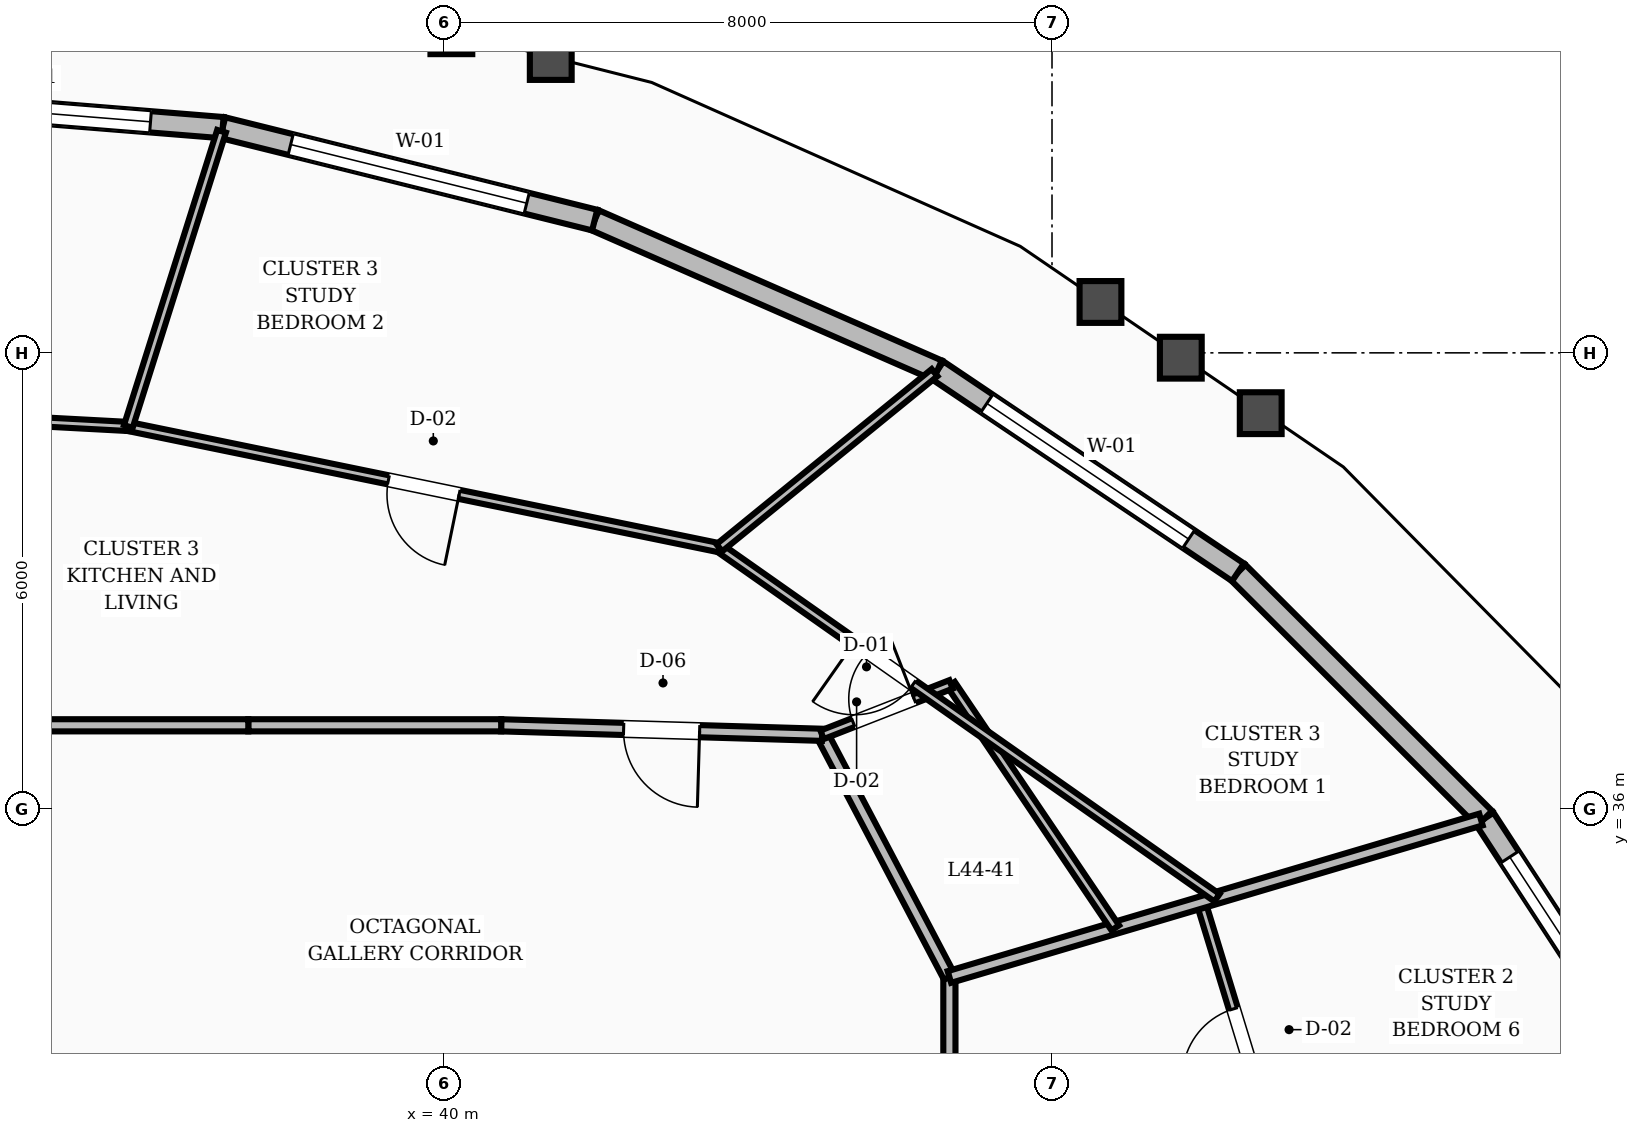
"""IFC4 building model, lengths in metres.
Left out: names, types, materials, properties, quantities, classifications, styles, units other than length and angle.
Written with IfcOpenShell. Run it as: python <this file> out.ifc"""

import sys

from ifc_helpers import new_model, si_unit, direction, frame, frame_2d, origin, place, context, subcontext, project, spatial, rectangle, extrude, element, fill, save


model = new_model("IFC4")
c1 = context("Model", 3, precision=1e-05, world=origin(), true_north=direction((0.0, 1.0)))
c2 = subcontext(c1, "Body", "Model", "MODEL_VIEW")
j1 = project(units=[si_unit("LENGTHUNIT", "METRE"), si_unit("PLANEANGLEUNIT", "RADIAN")], contexts=[c1])
p1 = place(None, origin())
s1 = spatial("IfcSite", under=j1, at=p1, CompositionType="ELEMENT")
p2 = place(p1, origin())
s2 = spatial("IfcBuilding", under=s1, at=p2, CompositionType="ELEMENT")
p3 = place(p2, frame((0.0, 0.0, 171.2)))
s3 = spatial("IfcBuildingStorey", under=s2, at=p3, CompositionType="ELEMENT", Elevation=171.2)
p4 = place(p3, frame((56.102, 32.179, 0.0), z_axis=(0.0, 0.0, 1.0), x_axis=(-0.546411241489, 0.837517017841, 0.0)))
e1 = element("IfcWall", 1, at=p4, inside=s3, PredefinedType="STANDARD", context=c2, shape_type="SweptSolid", body=[
    extrude(rectangle(XDim=4.412, YDim=0.28, at=frame_2d((2.206, 0.0))), origin(), (0.0, 0.0, 1.0), 2.82),
])
p5 = place(p4, frame((0.606, 0.0, 0.8)))
e2 = element("IfcOpeningElement", 2, at=p5, cuts=e1, PredefinedType="OPENING", context=c2, shape_type="SweptSolid", body=[
    extrude(rectangle(XDim=3.2, YDim=1.65, at=frame_2d((1.6, 0.825))), frame((0.0, 0.15, 0.0), z_axis=(0.0, -1.0, 0.0), x_axis=(1.0, 0.0, 0.0)), (0.0, 0.0, 1.0), 0.3),
])
p6 = place(p3, frame((53.691, 35.875, 0.0), z_axis=(0.0, 0.0, 1.0), x_axis=(-0.707692376563, 0.706520700443, 0.0)))
e3 = element("IfcWall", 3, at=p6, inside=s3, PredefinedType="STANDARD", context=c2, shape_type="SweptSolid", body=[
    extrude(rectangle(XDim=4.584, YDim=0.28, at=frame_2d((2.292, 0.0))), origin(), (0.0, 0.0, 1.0), 2.82),
])
p7 = place(p3, frame((50.447, 39.113, 0.0), z_axis=(0.0, 0.0, 1.0), x_axis=(-0.82985197946, 0.557983594909, 0.0)))
e4 = element("IfcWall", 4, at=p7, inside=s3, PredefinedType="STANDARD", context=c2, shape_type="SweptSolid", body=[
    extrude(rectangle(XDim=4.764, YDim=0.28, at=frame_2d((2.382, 0.0))), origin(), (0.0, 0.0, 1.0), 2.82),
])
p8 = place(p7, frame((0.782, 0.0, 0.8)))
e5 = element("IfcOpeningElement", 5, at=p8, cuts=e4, PredefinedType="OPENING", context=c2, shape_type="SweptSolid", body=[
    extrude(rectangle(XDim=3.2, YDim=1.65, at=frame_2d((1.6, 0.825))), frame((0.0, 0.15, 0.0), z_axis=(0.0, -1.0, 0.0), x_axis=(1.0, 0.0, 0.0)), (0.0, 0.0, 1.0), 0.3),
])
p9 = place(p3, frame((46.494, 41.771, 0.0), z_axis=(0.0, 0.0, 1.0), x_axis=(-0.916018444192, 0.401136148832, 0.0)))
e6 = element("IfcWall", 6, at=p9, inside=s3, PredefinedType="STANDARD", context=c2, shape_type="SweptSolid", body=[
    extrude(rectangle(XDim=4.924, YDim=0.28, at=frame_2d((2.462, 0.0))), origin(), (0.0, 0.0, 1.0), 2.82),
])
p10 = place(p3, frame((41.983, 43.747, 0.0), z_axis=(0.0, 0.0, 1.0), x_axis=(-0.970474792374, 0.241202565009, 0.0)))
e7 = element("IfcWall", 7, at=p10, inside=s3, PredefinedType="STANDARD", context=c2, shape_type="SweptSolid", body=[
    extrude(rectangle(XDim=5.043, YDim=0.28, at=frame_2d((2.521, 0.0))), origin(), (0.0, 0.0, 1.0), 2.82),
])
p11 = place(p10, frame((0.921, 0.0, 0.8)))
e8 = element("IfcOpeningElement", 8, at=p11, cuts=e7, PredefinedType="OPENING", context=c2, shape_type="SweptSolid", body=[
    extrude(rectangle(XDim=3.2, YDim=1.65, at=frame_2d((1.6, 0.825))), frame((0.0, 0.15, 0.0), z_axis=(0.0, -1.0, 0.0), x_axis=(1.0, 0.0, 0.0)), (0.0, 0.0, 1.0), 0.3),
])
p12 = place(p3, frame((37.09, 44.963, 0.0), z_axis=(0.0, 0.0, 1.0), x_axis=(-0.996760926591, 0.080421733512, 0.0)))
e9 = element("IfcWall", 9, at=p12, inside=s3, PredefinedType="STANDARD", context=c2, shape_type="SweptSolid", body=[
    extrude(rectangle(XDim=5.106, YDim=0.28, at=frame_2d((2.553, 0.0))), origin(), (0.0, 0.0, 1.0), 2.82),
])
p13 = place(p12, frame((0.953, 0.0, 0.8)))
e10 = element("IfcOpeningElement", 10, at=p13, cuts=e9, PredefinedType="OPENING", context=c2, shape_type="SweptSolid", body=[
    extrude(rectangle(XDim=3.2, YDim=1.65, at=frame_2d((1.6, 0.825))), frame((0.0, 0.15, 0.0), z_axis=(0.0, -1.0, 0.0), x_axis=(1.0, 0.0, 0.0)), (0.0, 0.0, 1.0), 0.3),
])
p14 = place(p3, frame((46.65, 30.068, 0.0), z_axis=(0.0, 0.0, 1.0), x_axis=(0.0, 1.0, 0.0)))
e11 = element("IfcWall", 11, at=p14, inside=s3, PredefinedType="SOLIDWALL", context=c2, shape_type="SweptSolid", body=[
    extrude(rectangle(XDim=3.721, YDim=0.16, at=frame_2d((1.86, 0.0))), origin(), (0.0, 0.0, 1.0), 2.8),
])
p15 = place(p3, frame((46.65, 33.789, 0.0), z_axis=(0.0, 0.0, 1.0), x_axis=(-0.46527115782, 0.885168204185, 0.0)))
e12 = element("IfcWall", 12, at=p15, inside=s3, PredefinedType="SOLIDWALL", context=c2, shape_type="SweptSolid", body=[
    extrude(rectangle(XDim=3.6, YDim=0.16, at=frame_2d((1.8, 0.0))), origin(), (0.0, 0.0, 1.0), 2.8),
])
p16 = place(p3, frame((44.975, 36.975, 0.0), z_axis=(0.0, 0.0, 1.0), x_axis=(-0.999561990195, 0.029594387265, 0.0)))
e13 = element("IfcWall", 13, at=p16, inside=s3, PredefinedType="SOLIDWALL", context=c2, shape_type="SweptSolid", body=[
    extrude(rectangle(XDim=4.224, YDim=0.16, at=frame_2d((2.112, 0.0))), origin(), (0.0, 0.0, 1.0), 2.8),
])
p17 = place(p16, frame((1.612, 0.0, 0.0)))
e14 = element("IfcOpeningElement", 14, at=p17, cuts=e13, PredefinedType="OPENING", context=c2, shape_type="SweptSolid", body=[
    extrude(rectangle(XDim=1.0, YDim=2.1, at=frame_2d((0.5, 1.05))), frame((0.0, 0.09, 0.0), z_axis=(0.0, -1.0, 0.0), x_axis=(1.0, 0.0, 0.0)), (0.0, 0.0, 1.0), 0.18),
])
p18 = place(p3, frame((40.753, 37.1, 0.0), z_axis=(0.0, 0.0, 1.0), x_axis=(-1.0, 0.0, 0.0)))
e15 = element("IfcWall", 15, at=p18, inside=s3, PredefinedType="SOLIDWALL", context=c2, shape_type="SweptSolid", body=[
    extrude(rectangle(XDim=3.327, YDim=0.16, at=frame_2d((1.664, 0.0))), origin(), (0.0, 0.0, 1.0), 2.8),
])
p19 = place(p3, frame((37.426, 37.1, 0.0), z_axis=(0.0, 0.0, 1.0), x_axis=(-1.0, 0.0, 0.0)))
e16 = element("IfcWall", 16, at=p19, inside=s3, PredefinedType="SOLIDWALL", context=c2, shape_type="SweptSolid", body=[
    extrude(rectangle(XDim=2.821, YDim=0.16, at=frame_2d((1.41, 0.0))), origin(), (0.0, 0.0, 1.0), 2.8),
])
p20 = place(p3, frame((51.092, 31.06, 0.0), z_axis=(0.0, 0.0, 1.0), x_axis=(-0.292120966116, 0.956381378507, 0.0)))
e17 = element("IfcWall", 17, at=p20, inside=s3, PredefinedType="PARTITIONING", context=c2, shape_type="SweptSolid", body=[
    extrude(rectangle(XDim=3.878, YDim=0.12, at=frame_2d((1.939, 0.0))), origin(), (0.0, 0.0, 1.0), 2.8),
])
p21 = place(p20, frame((1.464, 0.0, 0.0)))
e18 = element("IfcOpeningElement", 18, at=p21, cuts=e17, PredefinedType="OPENING", context=c2, shape_type="SweptSolid", body=[
    extrude(rectangle(XDim=0.95, YDim=2.1, at=frame_2d((0.475, 1.05))), frame((0.0, 0.07, 0.0), z_axis=(0.0, -1.0, 0.0), x_axis=(1.0, 0.0, 0.0)), (0.0, 0.0, 1.0), 0.14),
])
p22 = place(p3, frame((46.65, 33.789, 0.0), z_axis=(0.0, 0.0, 1.0), x_axis=(0.958820059034, 0.284014250337, 0.0)))
e19 = element("IfcWall", 19, at=p22, inside=s3, PredefinedType="SOLIDWALL", context=c2, shape_type="SweptSolid", body=[
    extrude(rectangle(XDim=7.294, YDim=0.16, at=frame_2d((3.647, 0.0))), origin(), (0.0, 0.0, 1.0), 2.8),
])
p23 = place(p3, frame((48.833, 34.435, 0.0), z_axis=(0.0, 0.0, 1.0), x_axis=(-0.559401227458, 0.828897018162, 0.0)))
e20 = element("IfcWall", 20, at=p23, inside=s3, PredefinedType="PARTITIONING", context=c2, shape_type="SweptSolid", body=[
    extrude(rectangle(XDim=3.864, YDim=0.12, at=frame_2d((1.932, 0.0))), origin(), (0.0, 0.0, 1.0), 2.8),
])
p24 = place(p3, frame((44.975, 36.975, 0.0), z_axis=(0.0, 0.0, 1.0), x_axis=(0.931414749869, 0.363959563312, 0.0)))
e21 = element("IfcWall", 21, at=p24, inside=s3, PredefinedType="PARTITIONING", context=c2, shape_type="SweptSolid", body=[
    extrude(rectangle(XDim=1.821, YDim=0.12, at=frame_2d((0.911, 0.0))), origin(), (0.0, 0.0, 1.0), 2.8),
])
p25 = place(p24, frame((0.44, 0.0, 0.0)))
e22 = element("IfcOpeningElement", 22, at=p25, cuts=e21, PredefinedType="OPENING", context=c2, shape_type="SweptSolid", body=[
    extrude(rectangle(XDim=0.86, YDim=2.1, at=frame_2d((0.43, 1.05))), frame((0.0, 0.07, 0.0), z_axis=(0.0, -1.0, 0.0), x_axis=(1.0, 0.0, 0.0)), (0.0, 0.0, 1.0), 0.14),
])
p26 = place(p3, frame((50.171, 34.832, 0.0), z_axis=(0.0, 0.0, 1.0), x_axis=(-0.81799193286, 0.57522969132, 0.0)))
e23 = element("IfcWall", 23, at=p26, inside=s3, PredefinedType="PARTITIONING", context=c2, shape_type="SweptSolid", body=[
    extrude(rectangle(XDim=8.004, YDim=0.12, at=frame_2d((4.002, 0.0))), origin(), (0.0, 0.0, 1.0), 2.8),
])
p27 = place(p26, frame((4.885, 0.0, 0.0)))
e24 = element("IfcOpeningElement", 24, at=p27, cuts=e23, PredefinedType="OPENING", context=c2, shape_type="SweptSolid", body=[
    extrude(rectangle(XDim=0.95, YDim=2.1, at=frame_2d((0.475, 1.05))), frame((0.0, 0.07, 0.0), z_axis=(0.0, -1.0, 0.0), x_axis=(1.0, 0.0, 0.0)), (0.0, 0.0, 1.0), 0.14),
])
p28 = place(p3, frame((43.623, 39.436, 0.0), z_axis=(0.0, 0.0, 1.0), x_axis=(-0.979585309952, 0.201028904702, 0.0)))
e25 = element("IfcWall", 25, at=p28, inside=s3, PredefinedType="PARTITIONING", context=c2, shape_type="SweptSolid", body=[
    extrude(rectangle(XDim=7.938, YDim=0.12, at=frame_2d((3.969, 0.0))), origin(), (0.0, 0.0, 1.0), 2.8),
])
p29 = place(p28, frame((3.494, 0.0, 0.0)))
e26 = element("IfcOpeningElement", 26, at=p29, cuts=e25, PredefinedType="OPENING", context=c2, shape_type="SweptSolid", body=[
    extrude(rectangle(XDim=0.95, YDim=2.1, at=frame_2d((0.475, 1.05))), frame((0.0, 0.07, 0.0), z_axis=(0.0, -1.0, 0.0), x_axis=(1.0, 0.0, 0.0)), (0.0, 0.0, 1.0), 0.14),
])
p30 = place(p3, frame((43.623, 39.436, 0.0), z_axis=(0.0, 0.0, 1.0), x_axis=(0.77566783813, 0.63114135096, 0.0)))
e27 = element("IfcWall", 27, at=p30, inside=s3, PredefinedType="PARTITIONING", context=c2, shape_type="SweptSolid", body=[
    extrude(rectangle(XDim=3.65, YDim=0.12, at=frame_2d((1.825, 0.0))), origin(), (0.0, 0.0, 1.0), 2.8),
])
p31 = place(p3, frame((35.848, 41.031, 0.0), z_axis=(0.0, 0.0, 1.0), x_axis=(-0.998579231715, 0.053287127784, 0.0)))
e28 = element("IfcWall", 28, at=p31, inside=s3, PredefinedType="PARTITIONING", context=c2, shape_type="SweptSolid", body=[
    extrude(rectangle(XDim=3.853, YDim=0.12, at=frame_2d((1.927, 0.0))), origin(), (0.0, 0.0, 1.0), 2.8),
])
p32 = place(p31, frame((1.452, 0.0, 0.0)))
e29 = element("IfcOpeningElement", 29, at=p32, cuts=e28, PredefinedType="OPENING", context=c2, shape_type="SweptSolid", body=[
    extrude(rectangle(XDim=0.95, YDim=2.1, at=frame_2d((0.475, 1.05))), frame((0.0, 0.07, 0.0), z_axis=(0.0, -1.0, 0.0), x_axis=(1.0, 0.0, 0.0)), (0.0, 0.0, 1.0), 0.14),
])
p33 = place(p3, frame((35.848, 41.031, 0.0), z_axis=(0.0, 0.0, 1.0), x_axis=(0.301226041054, 0.953552763192, 0.0)))
e30 = element("IfcWall", 30, at=p33, inside=s3, PredefinedType="PARTITIONING", context=c2, shape_type="SweptSolid", body=[
    extrude(rectangle(XDim=4.073, YDim=0.12, at=frame_2d((2.036, 0.0))), origin(), (0.0, 0.0, 1.0), 2.8),
])
p34 = place(p5, origin())
e31 = element("IfcWindow", 31, at=p34, inside=s3, PartitioningType="SINGLE_PANEL", PredefinedType="WINDOW", context=c2, shape_type="SweptSolid", body=[
    extrude(rectangle(XDim=3.2, YDim=1.65, at=frame_2d((1.6, 0.825))), frame((0.0, 0.03, 0.0), z_axis=(0.0, -1.0, 0.0), x_axis=(1.0, 0.0, 0.0)), (0.0, 0.0, 1.0), 0.06),
])
fill(e2, e31)
p35 = place(p8, origin())
e32 = element("IfcWindow", 32, at=p35, inside=s3, PartitioningType="SINGLE_PANEL", PredefinedType="WINDOW", context=c2, shape_type="SweptSolid", body=[
    extrude(rectangle(XDim=3.2, YDim=1.65, at=frame_2d((1.6, 0.825))), frame((0.0, 0.03, 0.0), z_axis=(0.0, -1.0, 0.0), x_axis=(1.0, 0.0, 0.0)), (0.0, 0.0, 1.0), 0.06),
])
fill(e5, e32)
p36 = place(p11, origin())
e33 = element("IfcWindow", 33, at=p36, inside=s3, PartitioningType="SINGLE_PANEL", PredefinedType="WINDOW", context=c2, shape_type="SweptSolid", body=[
    extrude(rectangle(XDim=3.2, YDim=1.65, at=frame_2d((1.6, 0.825))), frame((0.0, 0.03, 0.0), z_axis=(0.0, -1.0, 0.0), x_axis=(1.0, 0.0, 0.0)), (0.0, 0.0, 1.0), 0.06),
])
fill(e8, e33)
p37 = place(p13, origin())
e34 = element("IfcWindow", 34, at=p37, inside=s3, PartitioningType="SINGLE_PANEL", PredefinedType="WINDOW", context=c2, shape_type="SweptSolid", body=[
    extrude(rectangle(XDim=3.2, YDim=1.65, at=frame_2d((1.6, 0.825))), frame((0.0, 0.03, 0.0), z_axis=(0.0, -1.0, 0.0), x_axis=(1.0, 0.0, 0.0)), (0.0, 0.0, 1.0), 0.06),
])
fill(e10, e34)
p38 = place(p21, origin())
e35 = element("IfcDoor", 35, at=p38, inside=s3, OperationType="SINGLE_SWING_LEFT", PredefinedType="DOOR", context=c2, shape_type="SweptSolid", body=[
    extrude(rectangle(XDim=0.95, YDim=2.1, at=frame_2d((0.475, 1.05))), frame((0.0, 0.025, 0.0), z_axis=(0.0, -1.0, 0.0), x_axis=(1.0, 0.0, 0.0)), (0.0, 0.0, 1.0), 0.05),
])
fill(e18, e35)
p39 = place(p25, origin())
e36 = element("IfcDoor", 36, at=p39, inside=s3, OperationType="SINGLE_SWING_RIGHT", PredefinedType="DOOR", context=c2, shape_type="SweptSolid", body=[
    extrude(rectangle(XDim=0.86, YDim=2.1, at=frame_2d((0.43, 1.05))), frame((0.0, 0.025, 0.0), z_axis=(0.0, -1.0, 0.0), x_axis=(1.0, 0.0, 0.0)), (0.0, 0.0, 1.0), 0.05),
])
fill(e22, e36)
p40 = place(p17, origin())
e37 = element("IfcDoor", 37, at=p40, inside=s3, OperationType="SINGLE_SWING_LEFT", PredefinedType="DOOR", context=c2, shape_type="SweptSolid", body=[
    extrude(rectangle(XDim=1.0, YDim=2.1, at=frame_2d((0.5, 1.05))), frame((0.0, 0.025, 0.0), z_axis=(0.0, -1.0, 0.0), x_axis=(1.0, 0.0, 0.0)), (0.0, 0.0, 1.0), 0.05),
])
fill(e14, e37)
p41 = place(p27, origin())
e38 = element("IfcDoor", 38, at=p41, inside=s3, OperationType="SINGLE_SWING_RIGHT", PredefinedType="DOOR", context=c2, shape_type="SweptSolid", body=[
    extrude(rectangle(XDim=0.95, YDim=2.1, at=frame_2d((0.475, 1.05))), frame((0.0, 0.025, 0.0), z_axis=(0.0, -1.0, 0.0), x_axis=(1.0, 0.0, 0.0)), (0.0, 0.0, 1.0), 0.05),
])
fill(e24, e38)
p42 = place(p29, origin())
e39 = element("IfcDoor", 39, at=p42, inside=s3, OperationType="SINGLE_SWING_LEFT", PredefinedType="DOOR", context=c2, shape_type="SweptSolid", body=[
    extrude(rectangle(XDim=0.95, YDim=2.1, at=frame_2d((0.475, 1.05))), frame((0.0, 0.025, 0.0), z_axis=(0.0, -1.0, 0.0), x_axis=(1.0, 0.0, 0.0)), (0.0, 0.0, 1.0), 0.05),
])
fill(e26, e39)
save(model, sys.argv[1])
